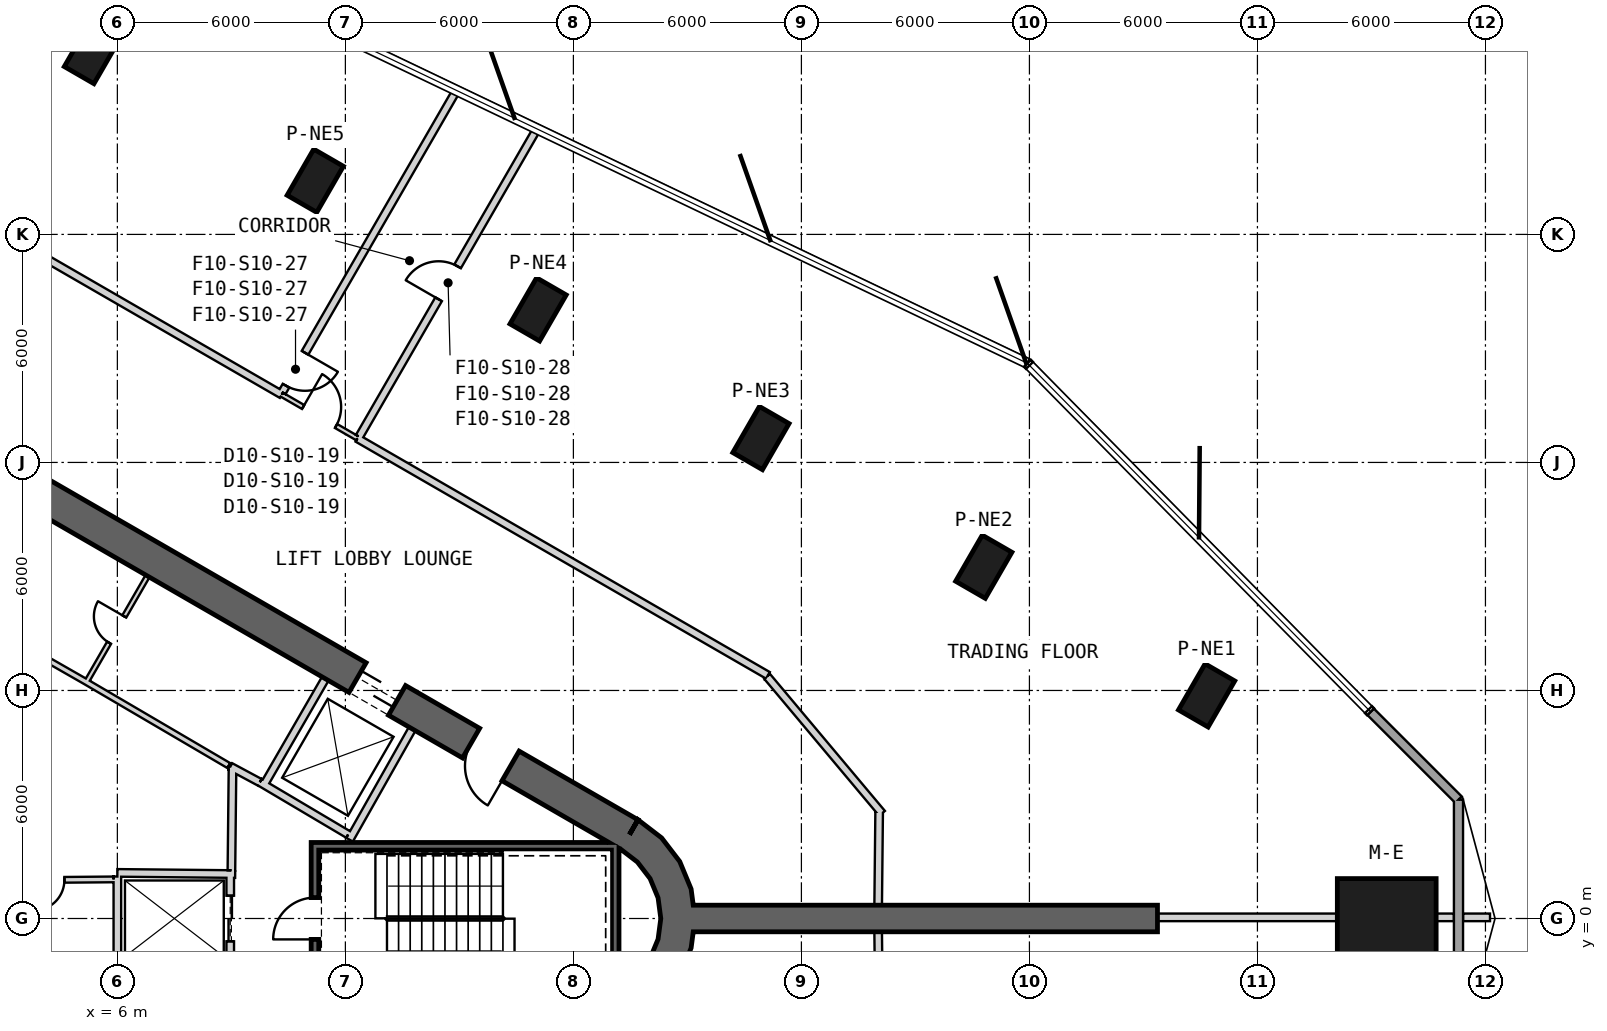
"""IFC4 building model, lengths in metres.
Left out: names, types, materials, properties, quantities, classifications, styles, units other than length and angle.
Written with IfcOpenShell. Run it as: python <this file> out.ifc"""

import sys

from ifc_helpers import new_model, si_unit, direction, frame, frame_2d, origin, origin_2d, place, context, subcontext, project, spatial, polyline, rectangle, outline, extrude, element, fill, save


model = new_model("IFC4")
c1 = context("Model", 3, precision=1e-05, world=origin(), true_north=direction((0.0, 1.0)))
c2 = subcontext(c1, "Body", "Model", "MODEL_VIEW")
j1 = project(units=[si_unit("LENGTHUNIT", "METRE"), si_unit("PLANEANGLEUNIT", "RADIAN")], contexts=[c1])
p1 = place(None, origin())
s1 = spatial("IfcSite", under=j1, at=p1, CompositionType="ELEMENT")
p2 = place(p1, origin())
s2 = spatial("IfcBuilding", under=s1, at=p2, CompositionType="ELEMENT")
p3 = place(p2, frame((0.0, 0.0, 181.2)))
s3 = spatial("IfcBuildingStorey", under=s2, at=p3, CompositionType="ELEMENT", Elevation=181.2)
p4 = place(p3, frame((39.402, 0.0, 0.0), z_axis=(0.0, 0.0, 1.0), x_axis=(1.0, 0.0, 0.0)))
e1 = element("IfcColumn", 1, at=p4, inside=s3, PredefinedType="COLUMN", context=c2, shape_type="SweptSolid", body=[
    extrude(rectangle(XDim=2.6, YDim=2.1, at=origin_2d()), origin(), (0.0, 0.0, 1.0), 4.0),
])
for number, where, z_axis, x_axis in (
    (2, (34.663, 5.87, 0.0), (0.0, 0.0, 1.0), (0.5, 0.866, 0.0)),
    (3, (28.799, 9.255, 0.0), (0.0, 0.0, 1.0), (0.5, 0.866, 0.0)),
    (4, (22.935, 12.641, 0.0), (0.0, 0.0, 1.0), (0.5, 0.866, 0.0)),
    (5, (17.071, 16.026, 0.0), (0.0, 0.0, 1.0), (0.5, 0.866, 0.0)),
    (6, (11.207, 19.412, 0.0), (0.0, 0.0, 1.0), (0.5, 0.866, 0.0)),
    (7, (5.344, 22.797, 0.0), (0.0, 0.0, 1.0), (0.5, 0.866, 0.0)),
):
    element("IfcColumn", number, at=place(p3, frame(where, z_axis=z_axis, x_axis=x_axis)), inside=s3, PredefinedType="COLUMN", context=c2, shape_type="SweptSolid", body=[
        extrude(rectangle(XDim=1.4, YDim=0.9, at=origin_2d()), origin(), (0.0, 0.0, 1.0), 4.0),
    ])
p5 = place(p3, frame((19.475, 2.208, 0.0), z_axis=(0.0, 0.0, 1.0), x_axis=(-0.866028369851, 0.499994862586, 0.0)))
e8 = element("IfcWall", 8, at=p5, inside=s3, PredefinedType="SHEAR", context=c2, shape_type="SweptSolid", body=[
    extrude(rectangle(XDim=31.523, YDim=0.9, at=frame_2d((15.762, 0.0))), origin(), (0.0, 0.0, 1.0), 4.0),
])
p6 = place(p5, frame((7.062, 0.0, 0.0)))
e9 = element("IfcOpeningElement", 9, at=p6, cuts=e8, PredefinedType="OPENING", context=c2, shape_type="SweptSolid", body=[
    extrude(rectangle(XDim=1.2, YDim=2.4, at=frame_2d((0.6, 1.2))), frame((0.0, 0.46, 0.0), z_axis=(0.0, -1.0, 0.0), x_axis=(1.0, 0.0, 0.0)), (0.0, 0.0, 1.0), 0.92),
])
p7 = place(p5, frame((3.612, 0.0, 0.0)))
e10 = element("IfcOpeningElement", 10, at=p7, cuts=e8, PredefinedType="OPENING", context=c2, shape_type="SweptSolid", body=[
    extrude(rectangle(XDim=1.2, YDim=2.4, at=frame_2d((0.6, 1.2))), frame((0.0, 0.46, 0.0), z_axis=(0.0, -1.0, 0.0), x_axis=(1.0, 0.0, 0.0)), (0.0, 0.0, 1.0), 0.92),
])
p8 = place(p5, frame((26.712, 0.0, 0.0)))
e11 = element("IfcOpeningElement", 11, at=p8, cuts=e8, PredefinedType="OPENING", context=c2, shape_type="SweptSolid", body=[
    extrude(rectangle(XDim=1.2, YDim=2.4, at=frame_2d((0.6, 1.2))), frame((0.0, 0.46, 0.0), z_axis=(0.0, -1.0, 0.0), x_axis=(1.0, 0.0, 0.0)), (0.0, 0.0, 1.0), 0.92),
])
p9 = place(p3, origin())
e12 = element("IfcWall", 12, at=p9, inside=s3, PredefinedType="SHEAR", context=c2, shape_type="SweptSolid", body=[
    extrude(outline(polyline([(19.7, -2.598), (20.321, -2.121), (20.798, -1.5), (21.098, -0.777), (21.2, 0.0), (21.098, 0.777), (20.798, 1.5), (20.321, 2.121), (19.7, 2.598), (19.25, 1.819), (19.685, 1.485), (20.019, 1.05), (20.229, 0.543), (20.3, 0.0), (20.229, -0.543), (20.019, -1.05), (19.685, -1.485), (19.25, -1.819), (19.7, -2.598)])), origin(), (0.0, 0.0, 1.0), 4.0),
])
p10 = place(p3, frame((21.15, 0.0, 0.0), z_axis=(0.0, 0.0, 1.0), x_axis=(1.0, 0.0, 0.0)))
e13 = element("IfcWall", 13, at=p10, inside=s3, PredefinedType="SHEAR", context=c2, shape_type="SweptSolid", body=[
    extrude(rectangle(XDim=12.22, YDim=0.7, at=frame_2d((6.11, 0.0))), origin(), (0.0, 0.0, 1.0), 4.0),
])
p11 = place(p3, frame((41.291, -3.126, 0.0), z_axis=(0.0, 0.0, 1.0), x_axis=(0.0, 1.0, 0.0)))
e14 = element("IfcWall", 14, at=p11, inside=s3, PredefinedType="SOLIDWALL", context=c2, shape_type="SweptSolid", body=[
    extrude(rectangle(XDim=6.253, YDim=0.24, at=frame_2d((3.126, 0.0))), origin(), (0.0, 0.0, 1.0), 3.7),
])
p12 = place(p3, frame((41.291, 3.126, 0.0), z_axis=(0.0, 0.0, 1.0), x_axis=(-0.707106781187, 0.707106781187, 0.0)))
e15 = element("IfcWall", 15, at=p12, inside=s3, PredefinedType="SOLIDWALL", context=c2, shape_type="SweptSolid", body=[
    extrude(rectangle(XDim=3.269, YDim=0.24, at=frame_2d((1.635, 0.0))), origin(), (0.0, 0.0, 1.0), 3.7),
])
p13 = place(p3, frame((9.847, 3.495, 0.0), z_axis=(0.0, 0.0, 1.0), x_axis=(0.499984717929, 0.866034226713, 0.0)))
e16 = element("IfcWall", 16, at=p13, inside=s3, PredefinedType="PLUMBINGWALL", context=c2, shape_type="SweptSolid", body=[
    extrude(rectangle(XDim=3.25, YDim=0.2, at=frame_2d((1.625, 0.0))), origin(), (0.0, 0.0, 1.0), 3.7),
])
p14 = place(p3, frame((12.11, 2.073, 0.0), z_axis=(0.0, 0.0, 1.0), x_axis=(0.49196600604, 0.870614408852, 0.0)))
e17 = element("IfcWall", 17, at=p14, inside=s3, PredefinedType="PLUMBINGWALL", context=c2, shape_type="SweptSolid", body=[
    extrude(rectangle(XDim=3.35, YDim=0.2, at=frame_2d((1.675, 0.0))), origin(), (0.0, 0.0, 1.0), 3.7),
])
p15 = place(p3, frame((12.073, 2.211, 0.0), z_axis=(0.0, 0.0, 1.0), x_axis=(-0.860414880418, 0.509594185166, 0.0)))
e18 = element("IfcWall", 18, at=p15, inside=s3, PredefinedType="PLUMBINGWALL", context=c2, shape_type="SweptSolid", body=[
    extrude(rectangle(XDim=2.7, YDim=0.2, at=frame_2d((1.35, 0.0))), origin(), (0.0, 0.0, 1.0), 3.7),
])
p16 = place(p3, frame((19.2, 1.9, -0.3), z_axis=(0.0, 0.0, 1.0), x_axis=(-1.0, 0.0, 0.0)))
e19 = element("IfcWall", 19, at=p16, inside=s3, PredefinedType="SHEAR", context=c2, shape_type="SweptSolid", body=[
    extrude(rectangle(XDim=8.1, YDim=0.2, at=frame_2d((4.05, 0.0))), origin(), (0.0, 0.0, 1.0), 4.0),
])
p17 = place(p3, frame((19.1, -2.0, -0.3), z_axis=(0.0, 0.0, 1.0), x_axis=(0.0, 1.0, 0.0)))
e20 = element("IfcWall", 20, at=p17, inside=s3, PredefinedType="SHEAR", context=c2, shape_type="SweptSolid", body=[
    extrude(rectangle(XDim=3.8, YDim=0.2, at=frame_2d((1.9, 0.0))), origin(), (0.0, 0.0, 1.0), 4.0),
])
p18 = place(p3, frame((11.2, -1.8, -0.3), z_axis=(0.0, 0.0, 1.0), x_axis=(0.0, 1.0, 0.0)))
e21 = element("IfcWall", 21, at=p18, inside=s3, PredefinedType="SHEAR", context=c2, shape_type="SweptSolid", body=[
    extrude(rectangle(XDim=3.6, YDim=0.2, at=frame_2d((1.8, 0.0))), origin(), (0.0, 0.0, 1.0), 4.0),
])
p19 = place(p18, frame((1.25, 0.0, 0.3)))
e22 = element("IfcOpeningElement", 22, at=p19, cuts=e21, PredefinedType="OPENING", context=c2, shape_type="SweptSolid", body=[
    extrude(rectangle(XDim=1.1, YDim=2.1, at=frame_2d((0.55, 1.05))), frame((0.0, 0.11, 0.0), z_axis=(0.0, -1.0, 0.0), x_axis=(1.0, 0.0, 0.0)), (0.0, 0.0, 1.0), 0.22),
])
p20 = place(p3, frame((8.97, 1.2, 0.0), z_axis=(0.0, 0.0, 1.0), x_axis=(0.0, -1.0, 0.0)))
e23 = element("IfcWall", 23, at=p20, inside=s3, PredefinedType="PLUMBINGWALL", context=c2, shape_type="SweptSolid", body=[
    extrude(rectangle(XDim=2.4, YDim=0.2, at=frame_2d((1.2, 0.0))), origin(), (0.0, 0.0, 1.0), 3.7),
])
p21 = place(p20, frame((0.6, 0.0, 0.0)))
e24 = element("IfcOpeningElement", 24, at=p21, cuts=e23, PredefinedType="OPENING", context=c2, shape_type="SweptSolid", body=[
    extrude(rectangle(XDim=1.2, YDim=2.4, at=frame_2d((0.6, 1.2))), frame((0.0, 0.11, 0.0), z_axis=(0.0, -1.0, 0.0), x_axis=(1.0, 0.0, 0.0)), (0.0, 0.0, 1.0), 0.22),
])
p22 = place(p3, frame((6.0, 1.2, 0.0), z_axis=(0.0, 0.0, 1.0), x_axis=(0.999949988, -0.010001074852, 0.0)))
e25 = element("IfcWall", 25, at=p22, inside=s3, PredefinedType="PLUMBINGWALL", context=c2, shape_type="SweptSolid", body=[
    extrude(rectangle(XDim=3.1, YDim=0.2, at=frame_2d((1.55, 0.0))), origin(), (0.0, 0.0, 1.0), 3.7),
])
p23 = place(p3, frame((6.0, -1.1, 0.0), z_axis=(0.0, 0.0, 1.0), x_axis=(0.0, 1.0, 0.0)))
e26 = element("IfcWall", 26, at=p23, inside=s3, PredefinedType="PLUMBINGWALL", context=c2, shape_type="SweptSolid", body=[
    extrude(rectangle(XDim=2.205, YDim=0.2, at=frame_2d((1.102, 0.0))), origin(), (0.0, 0.0, 1.0), 3.7),
])
p24 = place(p3, frame((5.17, 6.195, 0.0), z_axis=(0.0, 0.0, 1.0), x_axis=(0.499984717929, 0.866034226713, 0.0)))
e27 = element("IfcWall", 27, at=p24, inside=s3, PredefinedType="PARTITIONING", context=c2, shape_type="SweptSolid", body=[
    extrude(rectangle(XDim=3.25, YDim=0.12, at=frame_2d((1.625, 0.0))), origin(), (0.0, 0.0, 1.0), 3.7),
])
p25 = place(p24, frame((1.225, 0.0, 0.0)))
e28 = element("IfcOpeningElement", 28, at=p25, cuts=e27, PredefinedType="OPENING", context=c2, shape_type="SweptSolid", body=[
    extrude(rectangle(XDim=0.8, YDim=2.1, at=frame_2d((0.4, 1.05))), frame((0.0, 0.07, 0.0), z_axis=(0.0, -1.0, 0.0), x_axis=(1.0, 0.0, 0.0)), (0.0, 0.0, 1.0), 0.14),
])
p26 = place(p3, frame((8.974, 3.999, 0.0), z_axis=(0.0, 0.0, 1.0), x_axis=(0.880917147855, -0.473270513147, 0.0)))
e29 = element("IfcWall", 29, at=p26, inside=s3, PredefinedType="PARTITIONING", context=c2, shape_type="SweptSolid", body=[
    extrude(rectangle(XDim=0.878, YDim=0.2, at=frame_2d((0.439, 0.0))), origin(), (0.0, 0.0, 1.0), 3.7),
])
p27 = place(p3, frame((8.931, 4.025, 0.0), z_axis=(0.0, 0.0, 1.0), x_axis=(-0.862666884027, 0.505772525157, 0.0)))
e30 = element("IfcWall", 30, at=p27, inside=s3, PredefinedType="PLUMBINGWALL", context=c2, shape_type="SweptSolid", body=[
    extrude(rectangle(XDim=4.372, YDim=0.15, at=frame_2d((2.186, 0.0))), origin(), (0.0, 0.0, 1.0), 3.7),
])
p28 = place(p3, frame((5.159, 6.236, 0.0), z_axis=(0.0, 0.0, 1.0), x_axis=(-0.868105023632, 0.496380567654, 0.0)))
e31 = element("IfcWall", 31, at=p28, inside=s3, PredefinedType="PLUMBINGWALL", context=c2, shape_type="SweptSolid", body=[
    extrude(rectangle(XDim=7.072, YDim=0.15, at=frame_2d((3.536, 0.0))), origin(), (0.0, 0.0, 1.0), 3.7),
])
p29 = place(p3, frame((9.001, 1.27, 0.0), z_axis=(0.0, 0.0, 1.0), x_axis=(0.01074821465, 0.999942236273, 0.0)))
e32 = element("IfcWall", 32, at=p29, inside=s3, PredefinedType="PARTITIONING", context=c2, shape_type="SweptSolid", body=[
    extrude(rectangle(XDim=2.726, YDim=0.2, at=frame_2d((1.363, 0.0))), origin(), (0.0, 0.0, 1.0), 3.7),
])
p30 = place(p3, frame((2.384, 0.999, 0.0), z_axis=(0.0, 0.0, 1.0), x_axis=(0.999964703434, 0.008401897723, 0.0)))
e33 = element("IfcWall", 33, at=p30, inside=s3, PredefinedType="PLUMBINGWALL", context=c2, shape_type="SweptSolid", body=[
    extrude(rectangle(XDim=3.516, YDim=0.15, at=frame_2d((1.758, 0.0))), origin(), (0.0, 0.0, 1.0), 3.7),
])
p31 = place(p30, frame((1.422, 0.0, 0.0)))
e34 = element("IfcOpeningElement", 34, at=p31, cuts=e33, PredefinedType="OPENING", context=c2, shape_type="SweptSolid", body=[
    extrude(rectangle(XDim=0.8, YDim=2.1, at=frame_2d((0.4, 1.05))), frame((0.0, 0.085, 0.0), z_axis=(0.0, -1.0, 0.0), x_axis=(1.0, 0.0, 0.0)), (0.0, 0.0, 1.0), 0.17),
])
p32 = place(p3, frame((10.325, 13.784, 0.0), z_axis=(0.0, 0.0, 1.0), x_axis=(0.86602648383, -0.499998129301, 0.0)))
e35 = element("IfcWall", 35, at=p32, inside=s3, PredefinedType="PARTITIONING", context=c2, shape_type="SweptSolid", body=[
    extrude(rectangle(XDim=2.3, YDim=0.12, at=frame_2d((1.15, 0.0))), origin(), (0.0, 0.0, 1.0), 3.7),
])
p33 = place(p32, frame((0.65, 0.0, 0.0)))
e36 = element("IfcOpeningElement", 36, at=p33, cuts=e35, PredefinedType="OPENING", context=c2, shape_type="SweptSolid", body=[
    extrude(rectangle(XDim=1.0, YDim=2.1, at=frame_2d((0.5, 1.05))), frame((0.0, 0.07, 0.0), z_axis=(0.0, -1.0, 0.0), x_axis=(1.0, 0.0, 0.0)), (0.0, 0.0, 1.0), 0.14),
])
p34 = place(p3, frame((23.119, 6.398, 0.0), z_axis=(0.0, 0.0, 1.0), x_axis=(-0.866027821991, 0.499995811521, 0.0)))
e37 = element("IfcWall", 37, at=p34, inside=s3, PredefinedType="PARTITIONING", context=c2, shape_type="SweptSolid", body=[
    extrude(rectangle(XDim=12.473, YDim=0.2, at=frame_2d((6.236, 0.0))), origin(), (0.0, 0.0, 1.0), 2.88),
])
p35 = place(p3, frame((10.325, 13.784, 0.0), z_axis=(0.0, 0.0, 1.0), x_axis=(-0.866025119466, 0.500000492453, 0.0)))
e38 = element("IfcWall", 38, at=p35, inside=s3, PredefinedType="PARTITIONING", context=c2, shape_type="SweptSolid", body=[
    extrude(rectangle(XDim=18.673, YDim=0.2, at=frame_2d((9.336, 0.0))), origin(), (0.0, 0.0, 1.0), 2.88),
])
p36 = place(p3, frame((26.121, 2.766, 0.0), z_axis=(0.0, 0.0, 1.0), x_axis=(-0.642778291452, 0.766052261949, 0.0)))
e39 = element("IfcWall", 39, at=p36, inside=s3, PredefinedType="PARTITIONING", context=c2, shape_type="SweptSolid", body=[
    extrude(rectangle(XDim=4.706, YDim=0.2, at=frame_2d((2.353, 0.0))), origin(), (0.0, 0.0, 1.0), 2.78),
])
p37 = place(p3, frame((26.02, 0.35, 0.0), z_axis=(0.0, 0.0, 1.0), x_axis=(0.010532007244, 0.999944536874, 0.0)))
e40 = element("IfcWall", 40, at=p37, inside=s3, PredefinedType="PARTITIONING", context=c2, shape_type="SweptSolid", body=[
    extrude(rectangle(XDim=2.457, YDim=0.2, at=frame_2d((1.229, 0.0))), origin(), (0.0, 0.0, 1.0), 3.7),
])
p38 = place(p3, frame((26.047, -2.972, 0.0), z_axis=(0.0, 0.0, 1.0), x_axis=(-0.010519853563, 0.99994466481, 0.0)))
e41 = element("IfcWall", 41, at=p38, inside=s3, PredefinedType="PARTITIONING", context=c2, shape_type="SweptSolid", body=[
    extrude(rectangle(XDim=2.623, YDim=0.2, at=frame_2d((1.311, 0.0))), origin(), (0.0, 0.0, 1.0), 3.7),
])
p39 = place(p3, frame((14.924, 21.789, 0.0), z_axis=(0.0, 0.0, 1.0), x_axis=(-0.499989745068, -0.866031324391, 0.0)))
e42 = element("IfcWall", 42, at=p39, inside=s3, PredefinedType="PARTITIONING", context=c2, shape_type="SweptSolid", body=[
    extrude(rectangle(XDim=9.172, YDim=0.2, at=frame_2d((4.586, 0.0))), origin(), (0.0, 0.0, 1.0), 3.7),
])
p40 = place(p39, frame((7.972, 0.0, 0.0)))
e43 = element("IfcOpeningElement", 43, at=p40, cuts=e42, PredefinedType="OPENING", context=c2, shape_type="SweptSolid", body=[
    extrude(rectangle(XDim=1.0, YDim=2.1, at=frame_2d((0.5, 1.05))), frame((0.0, 0.11, 0.0), z_axis=(0.0, -1.0, 0.0), x_axis=(1.0, 0.0, 0.0)), (0.0, 0.0, 1.0), 0.22),
])
p41 = place(p3, frame((12.365, 12.676, 0.0), z_axis=(0.0, 0.0, 1.0), x_axis=(0.499998839552, 0.866026073768, 0.0)))
e44 = element("IfcWall", 44, at=p41, inside=s3, PredefinedType="PARTITIONING", context=c2, shape_type="SweptSolid", body=[
    extrude(rectangle(XDim=9.354, YDim=0.2, at=frame_2d((4.677, 0.0))), origin(), (0.0, 0.0, 1.0), 3.7),
])
p42 = place(p41, frame((4.177, 0.0, 0.0)))
e45 = element("IfcOpeningElement", 45, at=p42, cuts=e44, PredefinedType="OPENING", context=c2, shape_type="SweptSolid", body=[
    extrude(rectangle(XDim=1.0, YDim=2.1, at=frame_2d((0.5, 1.05))), frame((0.0, 0.11, 0.0), z_axis=(0.0, -1.0, 0.0), x_axis=(1.0, 0.0, 0.0)), (0.0, 0.0, 1.0), 0.22),
])
p43 = place(p3, frame((33.37, 0.03, 0.0), z_axis=(0.0, 0.0, 1.0), x_axis=(1.0, 0.0, 0.0)))
e46 = element("IfcWall", 46, at=p43, inside=s3, PredefinedType="PARTITIONING", context=c2, shape_type="SweptSolid", body=[
    extrude(rectangle(XDim=4.733, YDim=0.2, at=frame_2d((2.366, 0.0))), origin(), (0.0, 0.0, 1.0), 3.27),
])
p44 = place(p3, frame((40.702, 0.03, 0.0), z_axis=(0.0, 0.0, 1.0), x_axis=(1.0, 0.0, 0.0)))
e47 = element("IfcWall", 47, at=p44, inside=s3, PredefinedType="PARTITIONING", context=c2, shape_type="SweptSolid", body=[
    extrude(rectangle(XDim=0.468, YDim=0.2, at=frame_2d((0.234, 0.0))), origin(), (0.0, 0.0, 1.0), 3.7),
])
p45 = place(p3, frame((41.41, 0.03, 0.0), z_axis=(0.0, 0.0, 1.0), x_axis=(1.0, 0.0, 0.0)))
e48 = element("IfcWall", 48, at=p45, inside=s3, PredefinedType="PARTITIONING", context=c2, shape_type="SweptSolid", body=[
    extrude(rectangle(XDim=0.71, YDim=0.2, at=frame_2d((0.355, 0.0))), origin(), (0.0, 0.0, 1.0), 3.7),
])
p46 = place(p19, origin())
e49 = element("IfcDoor", 49, at=p46, inside=s3, OperationType="SINGLE_SWING_RIGHT", PredefinedType="USERDEFINED", context=c2, shape_type="SweptSolid", body=[
    extrude(rectangle(XDim=1.1, YDim=2.1, at=frame_2d((0.55, 1.05))), frame((0.0, 0.025, 0.0), z_axis=(0.0, -1.0, 0.0), x_axis=(1.0, 0.0, 0.0)), (0.0, 0.0, 1.0), 0.05),
])
fill(e22, e49)
p47 = place(p21, origin())
e50 = element("IfcDoor", 50, at=p47, inside=s3, OperationType="SLIDING_TO_LEFT", PredefinedType="USERDEFINED", context=c2, shape_type="SweptSolid", body=[
    extrude(rectangle(XDim=1.2, YDim=2.4, at=frame_2d((0.6, 1.2))), frame((0.0, 0.025, 0.0), z_axis=(0.0, -1.0, 0.0), x_axis=(1.0, 0.0, 0.0)), (0.0, 0.0, 1.0), 0.05),
])
fill(e24, e50)
p48 = place(p31, origin())
e51 = element("IfcDoor", 51, at=p48, inside=s3, OperationType="SINGLE_SWING_LEFT", PredefinedType="USERDEFINED", context=c2, shape_type="SweptSolid", body=[
    extrude(rectangle(XDim=0.8, YDim=2.1, at=frame_2d((0.4, 1.05))), frame((0.0, 0.025, 0.0), z_axis=(0.0, -1.0, 0.0), x_axis=(1.0, 0.0, 0.0)), (0.0, 0.0, 1.0), 0.05),
])
fill(e34, e51)
p49 = place(p25, origin())
e52 = element("IfcDoor", 52, at=p49, inside=s3, OperationType="SINGLE_SWING_LEFT", PredefinedType="USERDEFINED", context=c2, shape_type="SweptSolid", body=[
    extrude(rectangle(XDim=0.8, YDim=2.1, at=frame_2d((0.4, 1.05))), frame((0.0, 0.025, 0.0), z_axis=(0.0, -1.0, 0.0), x_axis=(1.0, 0.0, 0.0)), (0.0, 0.0, 1.0), 0.05),
])
fill(e28, e52)
p50 = place(p33, origin())
e53 = element("IfcDoor", 53, at=p50, inside=s3, OperationType="SINGLE_SWING_RIGHT", PredefinedType="NOTDEFINED", context=c2, shape_type="SweptSolid", body=[
    extrude(rectangle(XDim=1.0, YDim=2.1, at=frame_2d((0.5, 1.05))), frame((0.0, 0.025, 0.0), z_axis=(0.0, -1.0, 0.0), x_axis=(1.0, 0.0, 0.0)), (0.0, 0.0, 1.0), 0.05),
])
fill(e36, e53)
p51 = place(p40, origin())
e54 = element("IfcDoor", 54, at=p51, inside=s3, OperationType="SINGLE_SWING_RIGHT", PredefinedType="USERDEFINED", context=c2, shape_type="SweptSolid", body=[
    extrude(rectangle(XDim=1.0, YDim=2.1, at=frame_2d((0.5, 1.05))), frame((0.0, 0.025, 0.0), z_axis=(0.0, -1.0, 0.0), x_axis=(1.0, 0.0, 0.0)), (0.0, 0.0, 1.0), 0.05),
])
fill(e43, e54)
p52 = place(p42, origin())
e55 = element("IfcDoor", 55, at=p52, inside=s3, OperationType="SINGLE_SWING_RIGHT", PredefinedType="USERDEFINED", context=c2, shape_type="SweptSolid", body=[
    extrude(rectangle(XDim=1.0, YDim=2.1, at=frame_2d((0.5, 1.05))), frame((0.0, 0.025, 0.0), z_axis=(0.0, -1.0, 0.0), x_axis=(1.0, 0.0, 0.0)), (0.0, 0.0, 1.0), 0.05),
])
fill(e45, e55)
p53 = place(p6, origin())
e56 = element("IfcDoor", 56, at=p53, inside=s3, OperationType="SLIDING_TO_LEFT", PredefinedType="USERDEFINED", context=c2, shape_type="SweptSolid", body=[
    extrude(rectangle(XDim=1.2, YDim=2.4, at=frame_2d((0.6, 1.2))), frame((0.0, 0.025, 0.0), z_axis=(0.0, -1.0, 0.0), x_axis=(1.0, 0.0, 0.0)), (0.0, 0.0, 1.0), 0.05),
])
fill(e9, e56)
p54 = place(p7, origin())
e57 = element("IfcDoor", 57, at=p54, inside=s3, OperationType="SINGLE_SWING_LEFT", PredefinedType="USERDEFINED", context=c2, shape_type="SweptSolid", body=[
    extrude(rectangle(XDim=1.2, YDim=2.4, at=frame_2d((0.6, 1.2))), frame((0.0, 0.025, 0.0), z_axis=(0.0, -1.0, 0.0), x_axis=(1.0, 0.0, 0.0)), (0.0, 0.0, 1.0), 0.05),
])
fill(e10, e57)
save(model, sys.argv[1])
